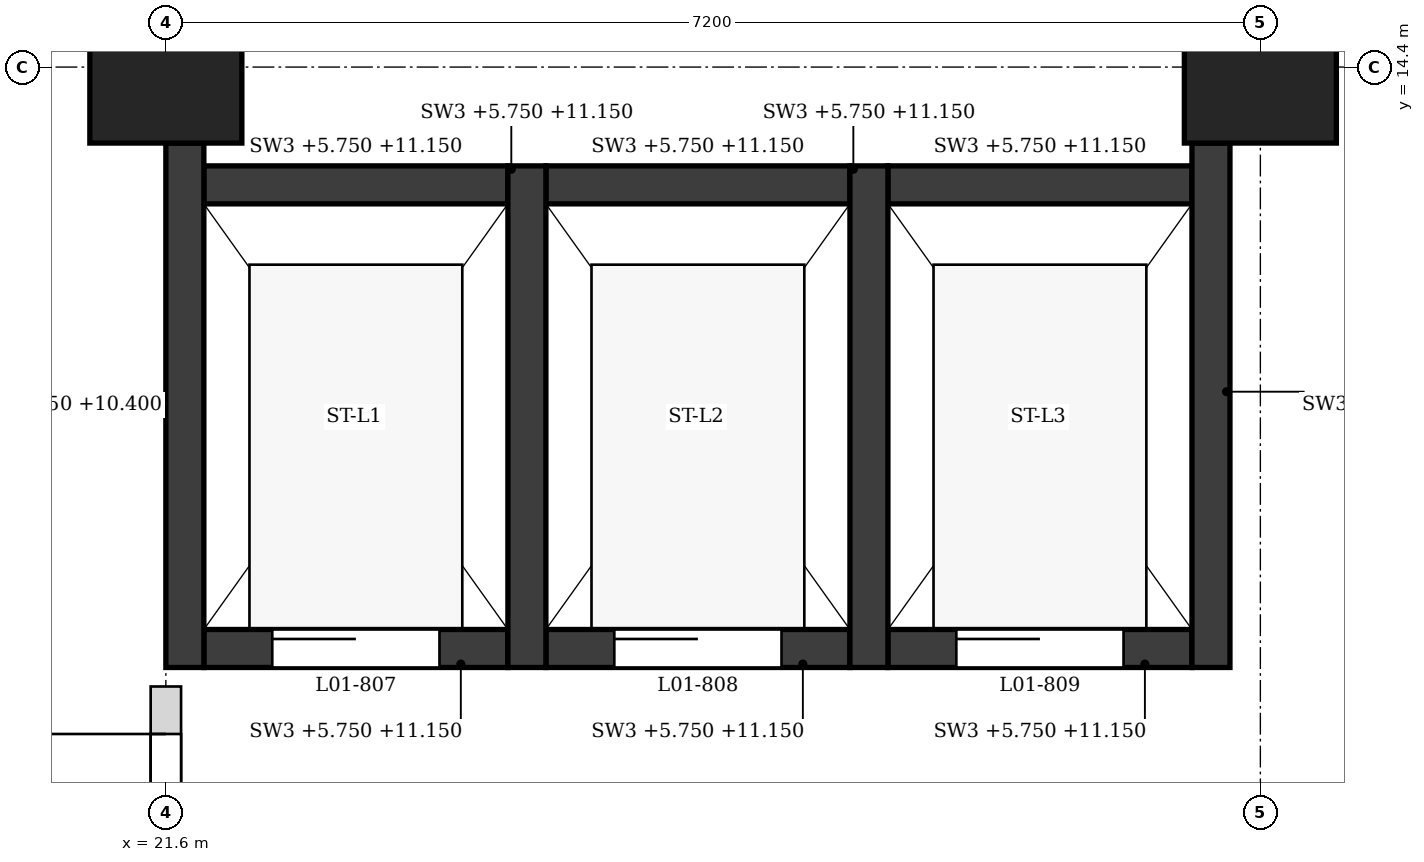
"""IFC4 building model, lengths in metres.
Left out: names, types, materials, properties, quantities, classifications, styles, units other than length and angle.
Written with IfcOpenShell. Run it as: python <this file> out.ifc"""

import sys

from ifc_helpers import new_model, si_unit, direction, frame, frame_2d, origin, origin_2d, place, context, subcontext, project, spatial, rectangle, extrude, element, fill, save


model = new_model("IFC4")
c1 = context("Model", 3, precision=1e-05, world=origin(), true_north=direction((0.0, 1.0)))
c2 = subcontext(c1, "Body", "Model", "MODEL_VIEW")
j1 = project(units=[si_unit("LENGTHUNIT", "METRE"), si_unit("PLANEANGLEUNIT", "RADIAN")], contexts=[c1])
p1 = place(None, origin())
s1 = spatial("IfcSite", under=j1, at=p1, CompositionType="ELEMENT")
p2 = place(p1, origin())
s2 = spatial("IfcBuilding", under=s1, at=p2, CompositionType="ELEMENT")
p3 = place(p2, frame((0.0, 0.0, 6.0)))
s3 = spatial("IfcBuildingStorey", under=s2, at=p3, CompositionType="ELEMENT", Elevation=6.0)
for number, where, z_axis, x_axis in (
    (1, (21.6, 14.4, 0.0), (0.0, 0.0, 1.0), (1.0, 0.0, 0.0)),
    (2, (28.8, 14.4, 0.0), (0.0, 0.0, 1.0), (1.0, 0.0, 0.0)),
):
    element("IfcColumn", number, at=place(p3, frame(where, z_axis=z_axis, x_axis=x_axis)), inside=s3, PredefinedType="COLUMN", context=c2, shape_type="SweptSolid", body=[
        extrude(rectangle(XDim=1.0, YDim=1.0, at=origin_2d()), origin(), (0.0, 0.0, 1.0), 5.4),
    ])
p4 = place(p3, frame((21.725, 10.45, -0.25), z_axis=(0.0, 0.0, 1.0), x_axis=(0.0, 1.0, 0.0)))
e3 = element("IfcWall", 3, at=p4, inside=s3, PredefinedType="SHEAR", context=c2, shape_type="SweptSolid", body=[
    extrude(rectangle(XDim=3.45, YDim=0.25, at=frame_2d((1.725, 0.0))), origin(), (0.0, 0.0, 1.0), 4.65),
])
for number, where, z_axis, x_axis in (
    (4, (23.975, 10.45, -0.25), (0.0, 0.0, 1.0), (0.0, 1.0, 0.0)),
    (5, (26.225, 10.45, -0.25), (0.0, 0.0, 1.0), (0.0, 1.0, 0.0)),
):
    element("IfcWall", number, at=place(p3, frame(where, z_axis=z_axis, x_axis=x_axis)), inside=s3, PredefinedType="SHEAR", context=c2, shape_type="SweptSolid", body=[
        extrude(rectangle(XDim=3.3, YDim=0.25, at=frame_2d((1.65, 0.0))), origin(), (0.0, 0.0, 1.0), 5.4),
    ])
p5 = place(p3, frame((28.475, 10.45, -0.25), z_axis=(0.0, 0.0, 1.0), x_axis=(0.0, 1.0, 0.0)))
e6 = element("IfcWall", 6, at=p5, inside=s3, PredefinedType="SHEAR", context=c2, shape_type="SweptSolid", body=[
    extrude(rectangle(XDim=3.45, YDim=0.25, at=frame_2d((1.725, 0.0))), origin(), (0.0, 0.0, 1.0), 5.4),
])
p6 = place(p3, frame((21.85, 10.575, -0.25), z_axis=(0.0, 0.0, 1.0), x_axis=(1.0, 0.0, 0.0)))
e7 = element("IfcWall", 7, at=p6, inside=s3, PredefinedType="SHEAR", context=c2, shape_type="SweptSolid", body=[
    extrude(rectangle(XDim=2.0, YDim=0.25, at=frame_2d((1.0, 0.0))), origin(), (0.0, 0.0, 1.0), 5.4),
])
p7 = place(p6, frame((0.45, 0.0, 0.25)))
e8 = element("IfcOpeningElement", 8, at=p7, cuts=e7, PredefinedType="OPENING", context=c2, shape_type="SweptSolid", body=[
    extrude(rectangle(XDim=1.1, YDim=2.1, at=frame_2d((0.55, 1.05))), frame((0.0, 0.135, 0.0), z_axis=(0.0, -1.0, 0.0), x_axis=(1.0, 0.0, 0.0)), (0.0, 0.0, 1.0), 0.27),
])
p8 = place(p3, frame((21.85, 13.625, -0.25), z_axis=(0.0, 0.0, 1.0), x_axis=(1.0, 0.0, 0.0)))
e9 = element("IfcWall", 9, at=p8, inside=s3, PredefinedType="SHEAR", context=c2, shape_type="SweptSolid", body=[
    extrude(rectangle(XDim=2.0, YDim=0.25, at=frame_2d((1.0, 0.0))), origin(), (0.0, 0.0, 1.0), 5.4),
])
p9 = place(p3, frame((24.1, 10.575, -0.25), z_axis=(0.0, 0.0, 1.0), x_axis=(1.0, 0.0, 0.0)))
e10 = element("IfcWall", 10, at=p9, inside=s3, PredefinedType="SHEAR", context=c2, shape_type="SweptSolid", body=[
    extrude(rectangle(XDim=2.0, YDim=0.25, at=frame_2d((1.0, 0.0))), origin(), (0.0, 0.0, 1.0), 5.4),
])
p10 = place(p9, frame((0.45, 0.0, 0.25)))
e11 = element("IfcOpeningElement", 11, at=p10, cuts=e10, PredefinedType="OPENING", context=c2, shape_type="SweptSolid", body=[
    extrude(rectangle(XDim=1.1, YDim=2.1, at=frame_2d((0.55, 1.05))), frame((0.0, 0.135, 0.0), z_axis=(0.0, -1.0, 0.0), x_axis=(1.0, 0.0, 0.0)), (0.0, 0.0, 1.0), 0.27),
])
p11 = place(p3, frame((24.1, 13.625, -0.25), z_axis=(0.0, 0.0, 1.0), x_axis=(1.0, 0.0, 0.0)))
e12 = element("IfcWall", 12, at=p11, inside=s3, PredefinedType="SHEAR", context=c2, shape_type="SweptSolid", body=[
    extrude(rectangle(XDim=2.0, YDim=0.25, at=frame_2d((1.0, 0.0))), origin(), (0.0, 0.0, 1.0), 5.4),
])
p12 = place(p3, frame((26.35, 10.575, -0.25), z_axis=(0.0, 0.0, 1.0), x_axis=(1.0, 0.0, 0.0)))
e13 = element("IfcWall", 13, at=p12, inside=s3, PredefinedType="SHEAR", context=c2, shape_type="SweptSolid", body=[
    extrude(rectangle(XDim=2.0, YDim=0.25, at=frame_2d((1.0, 0.0))), origin(), (0.0, 0.0, 1.0), 5.4),
])
p13 = place(p12, frame((0.45, 0.0, 0.25)))
e14 = element("IfcOpeningElement", 14, at=p13, cuts=e13, PredefinedType="OPENING", context=c2, shape_type="SweptSolid", body=[
    extrude(rectangle(XDim=1.1, YDim=2.1, at=frame_2d((0.55, 1.05))), frame((0.0, 0.135, 0.0), z_axis=(0.0, -1.0, 0.0), x_axis=(1.0, 0.0, 0.0)), (0.0, 0.0, 1.0), 0.27),
])
p14 = place(p3, frame((26.35, 13.625, -0.25), z_axis=(0.0, 0.0, 1.0), x_axis=(1.0, 0.0, 0.0)))
e15 = element("IfcWall", 15, at=p14, inside=s3, PredefinedType="SHEAR", context=c2, shape_type="SweptSolid", body=[
    extrude(rectangle(XDim=2.0, YDim=0.25, at=frame_2d((1.0, 0.0))), origin(), (0.0, 0.0, 1.0), 5.4),
])
p15 = place(p2, origin())
s4 = spatial("IfcBuildingStorey", under=s2, at=p15, CompositionType="ELEMENT", Elevation=0.0)
p16 = place(p15, frame((29.0, 7.7, 0.0), z_axis=(0.0, 0.0, 1.0), x_axis=(0.0, 1.0, 0.0)))
e16 = element("IfcWall", 16, at=p16, inside=s4, PredefinedType="SOLIDWALL", context=c2, shape_type="SweptSolid", body=[
    extrude(rectangle(XDim=6.2, YDim=0.4, at=frame_2d((3.1, 0.0))), origin(), (0.0, 0.0, 1.0), 10.55),
])
p17 = place(p3, frame((21.6, 7.7, 0.0), z_axis=(0.0, 0.0, 1.0), x_axis=(0.0, 1.0, 0.0)))
e17 = element("IfcWall", 17, at=p17, inside=s3, PredefinedType="PARTITIONING", context=c2, shape_type="SweptSolid", body=[
    extrude(rectangle(XDim=2.625, YDim=0.2, at=frame_2d((1.312, 0.0))), origin(), (0.0, 0.0, 1.0), 4.4),
])
p18 = place(p17, frame((0.312, 0.0, 0.0)))
e18 = element("IfcOpeningElement", 18, at=p18, cuts=e17, PredefinedType="OPENING", context=c2, shape_type="SweptSolid", body=[
    extrude(rectangle(XDim=2.0, YDim=2.4, at=frame_2d((1.0, 1.2))), frame((0.0, 0.11, 0.0), z_axis=(0.0, -1.0, 0.0), x_axis=(1.0, 0.0, 0.0)), (0.0, 0.0, 1.0), 0.22),
])
p19 = place(p7, origin())
e19 = element("IfcDoor", 19, at=p19, inside=s3, OperationType="SLIDING_TO_LEFT", PredefinedType="DOOR", context=c2, shape_type="SweptSolid", body=[
    extrude(rectangle(XDim=1.1, YDim=2.1, at=frame_2d((0.55, 1.05))), frame((0.0, 0.025, 0.0), z_axis=(0.0, -1.0, 0.0), x_axis=(1.0, 0.0, 0.0)), (0.0, 0.0, 1.0), 0.05),
])
fill(e8, e19)
p20 = place(p10, origin())
e20 = element("IfcDoor", 20, at=p20, inside=s3, OperationType="SLIDING_TO_LEFT", PredefinedType="DOOR", context=c2, shape_type="SweptSolid", body=[
    extrude(rectangle(XDim=1.1, YDim=2.1, at=frame_2d((0.55, 1.05))), frame((0.0, 0.025, 0.0), z_axis=(0.0, -1.0, 0.0), x_axis=(1.0, 0.0, 0.0)), (0.0, 0.0, 1.0), 0.05),
])
fill(e11, e20)
p21 = place(p13, origin())
e21 = element("IfcDoor", 21, at=p21, inside=s3, OperationType="SLIDING_TO_LEFT", PredefinedType="DOOR", context=c2, shape_type="SweptSolid", body=[
    extrude(rectangle(XDim=1.1, YDim=2.1, at=frame_2d((0.55, 1.05))), frame((0.0, 0.025, 0.0), z_axis=(0.0, -1.0, 0.0), x_axis=(1.0, 0.0, 0.0)), (0.0, 0.0, 1.0), 0.05),
])
fill(e14, e21)
p22 = place(p18, origin())
e22 = element("IfcDoor", 22, at=p22, inside=s3, OperationType="DOUBLE_DOOR_SINGLE_SWING", PredefinedType="DOOR", context=c2, shape_type="SweptSolid", body=[
    extrude(rectangle(XDim=2.0, YDim=2.4, at=frame_2d((1.0, 1.2))), frame((0.0, 0.025, 0.0), z_axis=(0.0, -1.0, 0.0), x_axis=(1.0, 0.0, 0.0)), (0.0, 0.0, 1.0), 0.05),
])
fill(e18, e22)
save(model, sys.argv[1])
